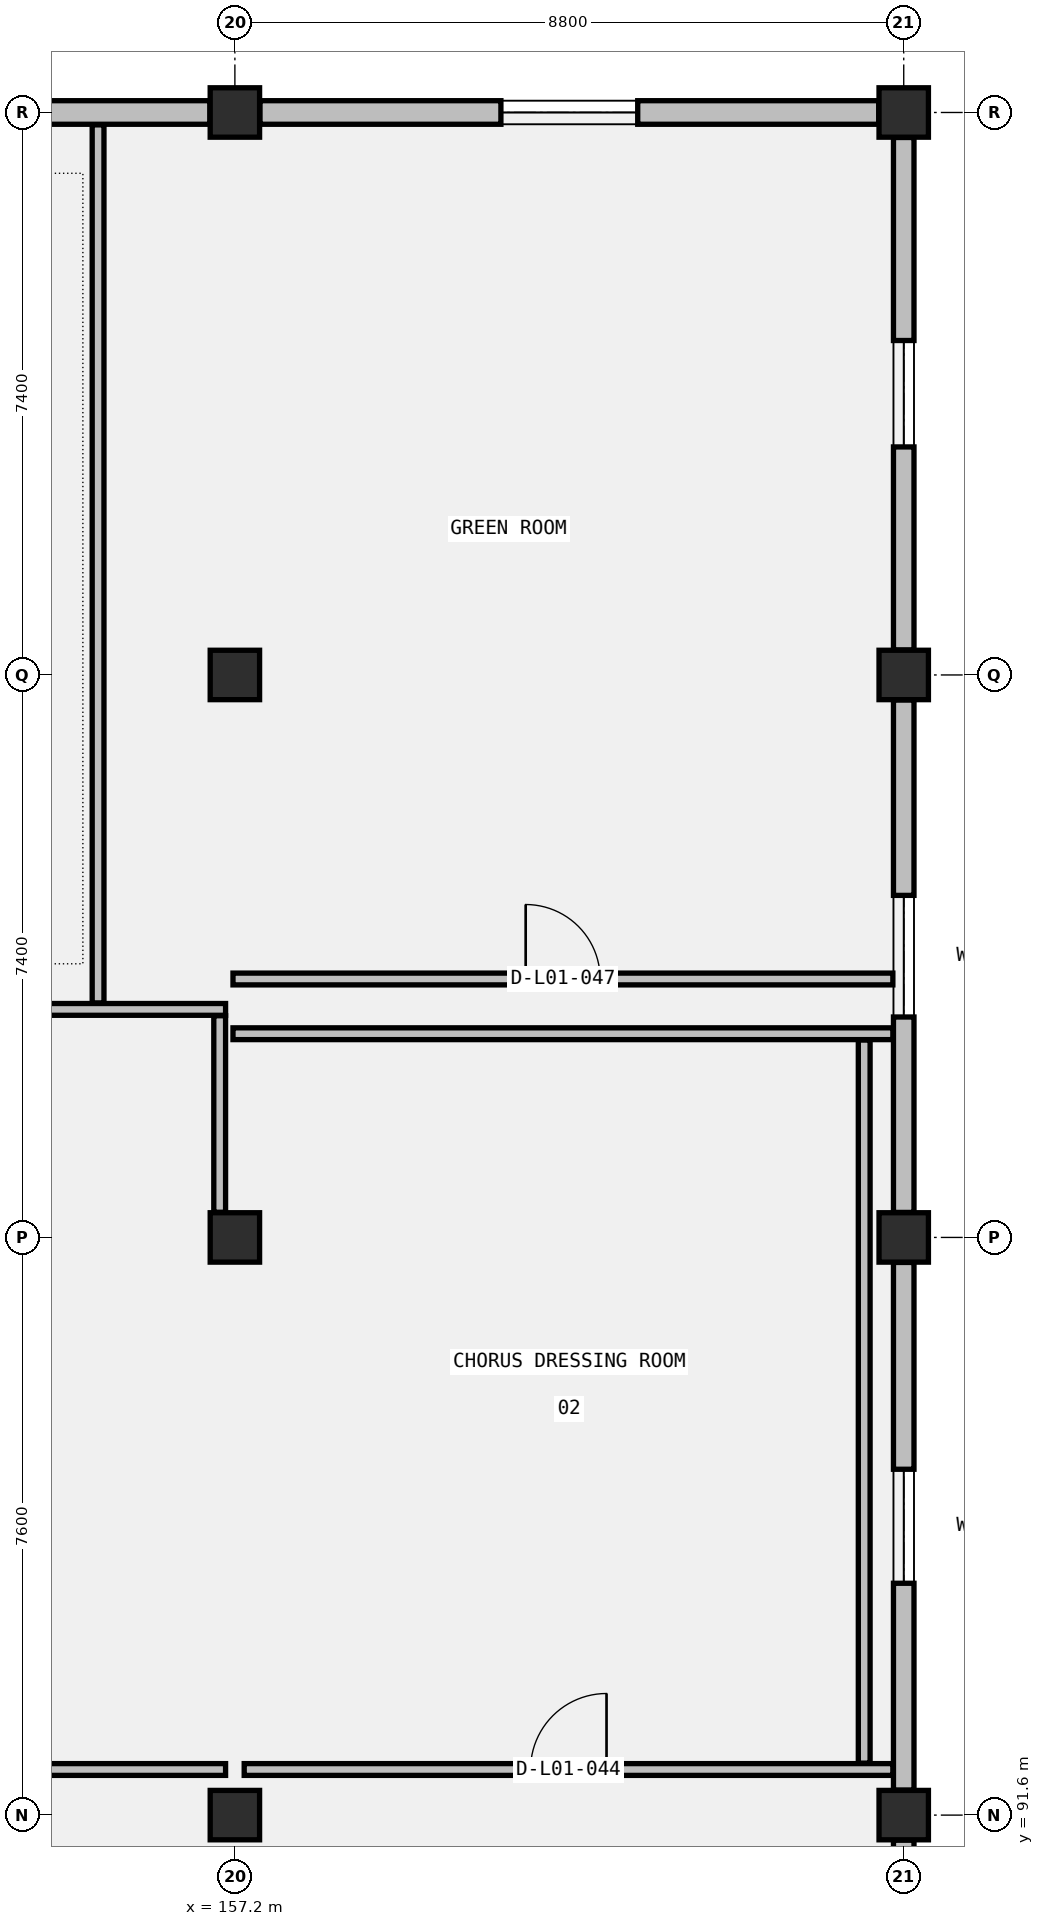
"""IFC4 building model, lengths in metres.
Left out: names, types, materials, properties, quantities, classifications, styles, units other than length and angle.
Written with IfcOpenShell. Run it as: python <this file> out.ifc"""

import sys

from ifc_helpers import new_model, si_unit, direction, frame, frame_2d, origin, origin_2d, place, context, subcontext, project, spatial, rectangle, extrude, element, fill, save


model = new_model("IFC4")
c1 = context("Model", 3, precision=1e-05, world=origin(), true_north=direction((0.0, 1.0)))
c2 = subcontext(c1, "Body", "Model", "MODEL_VIEW")
j1 = project(units=[si_unit("LENGTHUNIT", "METRE"), si_unit("PLANEANGLEUNIT", "RADIAN")], contexts=[c1])
p1 = place(None, origin())
s1 = spatial("IfcSite", under=j1, at=p1, CompositionType="ELEMENT")
p2 = place(p1, origin())
s2 = spatial("IfcBuilding", under=s1, at=p2, CompositionType="ELEMENT")
p3 = place(p2, frame((0.0, 0.0, 5.4)))
s3 = spatial("IfcBuildingStorey", under=s2, at=p3, CompositionType="ELEMENT", Elevation=5.4)
for number, where, z_axis, x_axis in (
    (1, (157.2, 91.6, 0.0), (0.0, 0.0, 1.0), (1.0, 0.0, 0.0)),
    (2, (157.2, 99.2, 0.0), (0.0, 0.0, 1.0), (1.0, 0.0, 0.0)),
    (3, (157.2, 106.6, 0.0), (0.0, 0.0, 1.0), (1.0, 0.0, 0.0)),
    (4, (157.2, 114.0, 0.0), (0.0, 0.0, 1.0), (1.0, 0.0, 0.0)),
    (5, (166.0, 91.6, 0.0), (0.0, 0.0, 1.0), (1.0, 0.0, 0.0)),
    (6, (166.0, 99.2, 0.0), (0.0, 0.0, 1.0), (1.0, 0.0, 0.0)),
    (7, (166.0, 106.6, 0.0), (0.0, 0.0, 1.0), (1.0, 0.0, 0.0)),
    (8, (166.0, 114.0, 0.0), (0.0, 0.0, 1.0), (1.0, 0.0, 0.0)),
):
    element("IfcColumn", number, at=place(p3, frame(where, z_axis=z_axis, x_axis=x_axis)), inside=s3, PredefinedType="COLUMN", context=c2, shape_type="SweptSolid", body=[
        extrude(rectangle(XDim=0.65, YDim=0.65, at=origin_2d()), origin(), (0.0, 0.0, 1.0), 4.6),
    ])
p4 = place(p3, frame((148.729, 114.0, 0.0), z_axis=(0.0, 0.0, 1.0), x_axis=(1.0, 0.0, 0.0)))
e9 = element("IfcWall", 9, at=p4, inside=s3, PredefinedType="STANDARD", context=c2, shape_type="SweptSolid", body=[
    extrude(rectangle(XDim=8.142, YDim=0.31, at=frame_2d((4.071, 0.0))), origin(), (0.0, 0.0, 1.0), 3.898),
])
p5 = place(p4, frame((3.171, 0.0, 0.9)))
e10 = element("IfcOpeningElement", 10, at=p5, cuts=e9, PredefinedType="OPENING", context=c2, shape_type="SweptSolid", body=[
    extrude(rectangle(XDim=1.8, YDim=2.4, at=frame_2d((0.9, 1.2))), frame((0.0, 0.165, 0.0), z_axis=(0.0, -1.0, 0.0), x_axis=(1.0, 0.0, 0.0)), (0.0, 0.0, 1.0), 0.33),
])
p6 = place(p3, frame((157.529, 114.0, 0.0), z_axis=(0.0, 0.0, 1.0), x_axis=(1.0, 0.0, 0.0)))
e11 = element("IfcWall", 11, at=p6, inside=s3, PredefinedType="STANDARD", context=c2, shape_type="SweptSolid", body=[
    extrude(rectangle(XDim=8.142, YDim=0.31, at=frame_2d((4.071, 0.0))), origin(), (0.0, 0.0, 1.0), 3.898),
])
p7 = place(p6, frame((3.171, 0.0, 0.9)))
e12 = element("IfcOpeningElement", 12, at=p7, cuts=e11, PredefinedType="OPENING", context=c2, shape_type="SweptSolid", body=[
    extrude(rectangle(XDim=1.8, YDim=2.4, at=frame_2d((0.9, 1.2))), frame((0.0, 0.165, 0.0), z_axis=(0.0, -1.0, 0.0), x_axis=(1.0, 0.0, 0.0)), (0.0, 0.0, 1.0), 0.33),
])
p8 = place(p3, frame((166.0, 84.329, 0.0), z_axis=(0.0, 0.0, 1.0), x_axis=(0.0, 1.0, 0.0)))
e13 = element("IfcWall", 13, at=p8, inside=s3, PredefinedType="STANDARD", context=c2, shape_type="SweptSolid", body=[
    extrude(rectangle(XDim=6.942, YDim=0.27, at=frame_2d((3.471, 0.0))), origin(), (0.0, 0.0, 1.0), 4.044),
])
p9 = place(p8, frame((2.171, 0.0, 0.9)))
e14 = element("IfcOpeningElement", 14, at=p9, cuts=e13, PredefinedType="OPENING", context=c2, shape_type="SweptSolid", body=[
    extrude(rectangle(XDim=2.6, YDim=2.2, at=frame_2d((1.3, 1.1))), frame((0.0, 0.145, 0.0), z_axis=(0.0, -1.0, 0.0), x_axis=(1.0, 0.0, 0.0)), (0.0, 0.0, 1.0), 0.29),
])
p10 = place(p3, frame((166.0, 91.929, 0.0), z_axis=(0.0, 0.0, 1.0), x_axis=(0.0, 1.0, 0.0)))
e15 = element("IfcWall", 15, at=p10, inside=s3, PredefinedType="STANDARD", context=c2, shape_type="SweptSolid", body=[
    extrude(rectangle(XDim=6.942, YDim=0.27, at=frame_2d((3.471, 0.0))), origin(), (0.0, 0.0, 1.0), 4.044),
])
p11 = place(p10, frame((2.721, 0.0, 0.9)))
e16 = element("IfcOpeningElement", 16, at=p11, cuts=e15, PredefinedType="OPENING", context=c2, shape_type="SweptSolid", body=[
    extrude(rectangle(XDim=1.5, YDim=2.15, at=frame_2d((0.75, 1.075))), frame((0.0, 0.145, 0.0), z_axis=(0.0, -1.0, 0.0), x_axis=(1.0, 0.0, 0.0)), (0.0, 0.0, 1.0), 0.29),
])
p12 = place(p3, frame((166.0, 99.529, 0.0), z_axis=(0.0, 0.0, 1.0), x_axis=(0.0, 1.0, 0.0)))
e17 = element("IfcWall", 17, at=p12, inside=s3, PredefinedType="STANDARD", context=c2, shape_type="SweptSolid", body=[
    extrude(rectangle(XDim=6.742, YDim=0.27, at=frame_2d((3.371, 0.0))), origin(), (0.0, 0.0, 1.0), 4.044),
])
p13 = place(p12, frame((2.571, 0.0, 0.9)))
e18 = element("IfcOpeningElement", 18, at=p13, cuts=e17, PredefinedType="OPENING", context=c2, shape_type="SweptSolid", body=[
    extrude(rectangle(XDim=1.6, YDim=1.8, at=frame_2d((0.8, 0.9))), frame((0.0, 0.145, 0.0), z_axis=(0.0, -1.0, 0.0), x_axis=(1.0, 0.0, 0.0)), (0.0, 0.0, 1.0), 0.29),
])
p14 = place(p3, frame((166.0, 106.929, 0.0), z_axis=(0.0, 0.0, 1.0), x_axis=(0.0, 1.0, 0.0)))
e19 = element("IfcWall", 19, at=p14, inside=s3, PredefinedType="STANDARD", context=c2, shape_type="SweptSolid", body=[
    extrude(rectangle(XDim=6.742, YDim=0.27, at=frame_2d((3.371, 0.0))), origin(), (0.0, 0.0, 1.0), 4.044),
])
p15 = place(p14, frame((2.671, 0.0, 0.9)))
e20 = element("IfcOpeningElement", 20, at=p15, cuts=e19, PredefinedType="OPENING", context=c2, shape_type="SweptSolid", body=[
    extrude(rectangle(XDim=1.4, YDim=1.2, at=frame_2d((0.7, 0.6))), frame((0.0, 0.145, 0.0), z_axis=(0.0, -1.0, 0.0), x_axis=(1.0, 0.0, 0.0)), (0.0, 0.0, 1.0), 0.29),
])
p16 = place(p3, frame((148.522, 92.2, 0.0), z_axis=(0.0, 0.0, 1.0), x_axis=(1.0, 0.0, 0.0)))
e21 = element("IfcWall", 21, at=p16, inside=s3, PredefinedType="PARTITIONING", context=c2, shape_type="SweptSolid", body=[
    extrude(rectangle(XDim=8.555, YDim=0.155, at=frame_2d((4.277, 0.0))), origin(), (0.0, 0.0, 1.0), 4.044),
])
p17 = place(p16, frame((3.778, 0.0, 0.0)))
e22 = element("IfcOpeningElement", 22, at=p17, cuts=e21, PredefinedType="OPENING", context=c2, shape_type="SweptSolid", body=[
    extrude(rectangle(XDim=1.0, YDim=2.15, at=frame_2d((0.5, 1.075))), frame((0.0, 0.087, 0.0), z_axis=(0.0, -1.0, 0.0), x_axis=(1.0, 0.0, 0.0)), (0.0, 0.0, 1.0), 0.175),
])
p18 = place(p3, frame((148.375, 102.2, 0.0), z_axis=(0.0, 0.0, 1.0), x_axis=(1.0, 0.0, 0.0)))
e23 = element("IfcWall", 23, at=p18, inside=s3, PredefinedType="PARTITIONING", context=c2, shape_type="SweptSolid", body=[
    extrude(rectangle(XDim=8.702, YDim=0.155, at=frame_2d((4.351, 0.0))), origin(), (0.0, 0.0, 1.0), 4.044),
])
p19 = place(p3, frame((157.0, 99.531, 0.0), z_axis=(0.0, 0.0, 1.0), x_axis=(0.0, 1.0, 0.0)))
e24 = element("IfcWall", 24, at=p19, inside=s3, PredefinedType="PARTITIONING", context=c2, shape_type="SweptSolid", body=[
    extrude(rectangle(XDim=2.585, YDim=0.155, at=frame_2d((1.293, 0.0))), origin(), (0.0, 0.0, 1.0), 4.36),
])
p20 = place(p3, frame((157.323, 92.2, 0.0), z_axis=(0.0, 0.0, 1.0), x_axis=(1.0, 0.0, 0.0)))
e25 = element("IfcWall", 25, at=p20, inside=s3, PredefinedType="PARTITIONING", context=c2, shape_type="SweptSolid", body=[
    extrude(rectangle(XDim=8.534, YDim=0.155, at=frame_2d((4.267, 0.0))), origin(), (0.0, 0.0, 1.0), 3.988),
])
p21 = place(p20, frame((3.767, 0.0, 0.0)))
e26 = element("IfcOpeningElement", 26, at=p21, cuts=e25, PredefinedType="OPENING", context=c2, shape_type="SweptSolid", body=[
    extrude(rectangle(XDim=1.0, YDim=2.15, at=frame_2d((0.5, 1.075))), frame((0.0, 0.087, 0.0), z_axis=(0.0, -1.0, 0.0), x_axis=(1.0, 0.0, 0.0)), (0.0, 0.0, 1.0), 0.175),
])
p22 = place(p3, frame((157.175, 101.88, 0.0), z_axis=(0.0, 0.0, 1.0), x_axis=(1.0, 0.0, 0.0)))
e27 = element("IfcWall", 27, at=p22, inside=s3, PredefinedType="PARTITIONING", context=c2, shape_type="SweptSolid", body=[
    extrude(rectangle(XDim=8.682, YDim=0.155, at=frame_2d((4.341, 0.0))), origin(), (0.0, 0.0, 1.0), 3.988),
])
p23 = place(p3, frame((165.48, 92.283, 0.0), z_axis=(0.0, 0.0, 1.0), x_axis=(0.0, 1.0, 0.0)))
e28 = element("IfcWall", 28, at=p23, inside=s3, PredefinedType="PARTITIONING", context=c2, shape_type="SweptSolid", body=[
    extrude(rectangle(XDim=9.513, YDim=0.155, at=frame_2d((4.756, 0.0))), origin(), (0.0, 0.0, 1.0), 3.898),
])
p24 = place(p3, frame((155.4, 102.285, 0.0), z_axis=(0.0, 0.0, 1.0), x_axis=(0.0, 1.0, 0.0)))
e29 = element("IfcWall", 29, at=p24, inside=s3, PredefinedType="PARTITIONING", context=c2, shape_type="SweptSolid", body=[
    extrude(rectangle(XDim=11.552, YDim=0.155, at=frame_2d((5.776, 0.0))), origin(), (0.0, 0.0, 1.0), 3.898),
])
p25 = place(p3, frame((157.175, 102.6, 0.0), z_axis=(0.0, 0.0, 1.0), x_axis=(1.0, 0.0, 0.0)))
e30 = element("IfcWall", 30, at=p25, inside=s3, PredefinedType="PARTITIONING", context=c2, shape_type="SweptSolid", body=[
    extrude(rectangle(XDim=8.682, YDim=0.155, at=frame_2d((4.341, 0.0))), origin(), (0.0, 0.0, 1.0), 3.988),
])
p26 = place(p25, frame((3.851, 0.0, 0.0)))
e31 = element("IfcOpeningElement", 31, at=p26, cuts=e30, PredefinedType="OPENING", context=c2, shape_type="SweptSolid", body=[
    extrude(rectangle(XDim=0.98, YDim=2.15, at=frame_2d((0.49, 1.075))), frame((0.0, 0.087, 0.0), z_axis=(0.0, -1.0, 0.0), x_axis=(1.0, 0.0, 0.0)), (0.0, 0.0, 1.0), 0.175),
])
p27 = place(p7, origin())
e32 = element("IfcWindow", 32, at=p27, inside=s3, PartitioningType="DOUBLE_PANEL_VERTICAL", PredefinedType="WINDOW", context=c2, shape_type="SweptSolid", body=[
    extrude(rectangle(XDim=1.8, YDim=2.4, at=frame_2d((0.9, 1.2))), frame((0.0, 0.03, 0.0), z_axis=(0.0, -1.0, 0.0), x_axis=(1.0, 0.0, 0.0)), (0.0, 0.0, 1.0), 0.06),
])
fill(e12, e32)
p28 = place(p11, origin())
e33 = element("IfcWindow", 33, at=p28, inside=s3, PartitioningType="DOUBLE_PANEL_VERTICAL", PredefinedType="WINDOW", context=c2, shape_type="SweptSolid", body=[
    extrude(rectangle(XDim=1.5, YDim=2.15, at=frame_2d((0.75, 1.075))), frame((0.0, 0.03, 0.0), z_axis=(0.0, -1.0, 0.0), x_axis=(1.0, 0.0, 0.0)), (0.0, 0.0, 1.0), 0.06),
])
fill(e16, e33)
p29 = place(p13, origin())
e34 = element("IfcWindow", 34, at=p29, inside=s3, PartitioningType="DOUBLE_PANEL_VERTICAL", PredefinedType="WINDOW", context=c2, shape_type="SweptSolid", body=[
    extrude(rectangle(XDim=1.6, YDim=1.8, at=frame_2d((0.8, 0.9))), frame((0.0, 0.03, 0.0), z_axis=(0.0, -1.0, 0.0), x_axis=(1.0, 0.0, 0.0)), (0.0, 0.0, 1.0), 0.06),
])
fill(e18, e34)
p30 = place(p15, origin())
e35 = element("IfcWindow", 35, at=p30, inside=s3, PartitioningType="SINGLE_PANEL", PredefinedType="WINDOW", context=c2, shape_type="SweptSolid", body=[
    extrude(rectangle(XDim=1.4, YDim=1.2, at=frame_2d((0.7, 0.6))), frame((0.0, 0.03, 0.0), z_axis=(0.0, -1.0, 0.0), x_axis=(1.0, 0.0, 0.0)), (0.0, 0.0, 1.0), 0.06),
])
fill(e20, e35)
p31 = place(p21, origin())
e36 = element("IfcDoor", 36, at=p31, inside=s3, OperationType="SINGLE_SWING_RIGHT", PredefinedType="DOOR", context=c2, shape_type="SweptSolid", body=[
    extrude(rectangle(XDim=1.0, YDim=2.15, at=frame_2d((0.5, 1.075))), frame((0.0, 0.025, 0.0), z_axis=(0.0, -1.0, 0.0), x_axis=(1.0, 0.0, 0.0)), (0.0, 0.0, 1.0), 0.05),
])
fill(e26, e36)
p32 = place(p26, origin())
e37 = element("IfcDoor", 37, at=p32, inside=s3, OperationType="SINGLE_SWING_LEFT", PredefinedType="DOOR", context=c2, shape_type="SweptSolid", body=[
    extrude(rectangle(XDim=0.98, YDim=2.15, at=frame_2d((0.49, 1.075))), frame((0.0, 0.025, 0.0), z_axis=(0.0, -1.0, 0.0), x_axis=(1.0, 0.0, 0.0)), (0.0, 0.0, 1.0), 0.05),
])
fill(e31, e37)
save(model, sys.argv[1])
